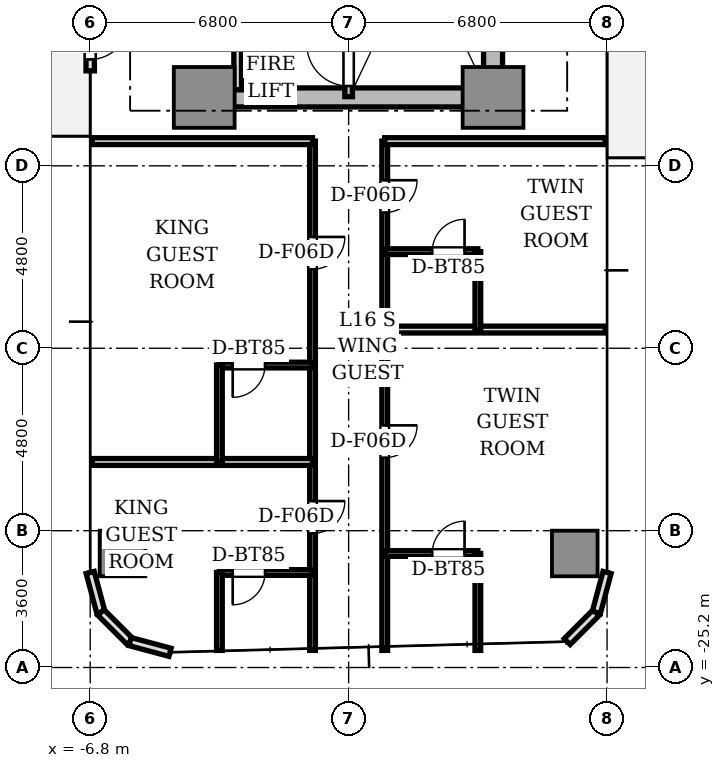
"""IFC4 building model, lengths in metres.
Left out: names, types, materials, properties, quantities, classifications, styles, units other than length and angle.
Written with IfcOpenShell. Run it as: python <this file> out.ifc"""

import sys

from ifc_helpers import new_model, si_unit, direction, frame, frame_2d, origin, origin_2d, place, context, subcontext, project, spatial, rectangle, extrude, source, transform, mapped, element, fill, save


model = new_model("IFC4")
c1 = context("Model", 3, precision=1e-05, world=origin(), true_north=direction((0.0, 1.0)))
c2 = subcontext(c1, "Body", "Model", "MODEL_VIEW")
j1 = project(units=[si_unit("LENGTHUNIT", "METRE"), si_unit("PLANEANGLEUNIT", "RADIAN")], contexts=[c1])
p1 = place(None, origin())
s1 = spatial("IfcSite", under=j1, at=p1, CompositionType="ELEMENT")
p2 = place(p1, origin())
s2 = spatial("IfcBuilding", under=s1, at=p2, CompositionType="ELEMENT")
p3 = place(p2, frame((0.0, 0.0, 61.1)))
s3 = spatial("IfcBuildingStorey", under=s2, at=p3, CompositionType="ELEMENT", Elevation=61.1)
p4 = place(p3, frame((-3.55, -10.2, 0.0), z_axis=(0.0, 0.0, 1.0), x_axis=(1.0, 0.0, 0.0)))
e1 = element("IfcWall", 1, at=p4, inside=s3, PredefinedType="SHEAR", context=c2, shape_type="SweptSolid", body=[
    extrude(rectangle(XDim=7.1, YDim=0.5, at=frame_2d((3.55, 0.0))), origin(), (0.0, 0.0, 1.0), 3.11),
])
p5 = place(p3, frame((3.8, -9.75, 0.0), z_axis=(0.0, 0.0, 1.0), x_axis=(0.0, 1.0, 0.0)))
e2 = element("IfcWall", 2, at=p5, inside=s3, PredefinedType="SHEAR", context=c2, shape_type="SweptSolid", body=[
    extrude(rectangle(XDim=6.9, YDim=0.5, at=frame_2d((3.45, 0.0))), origin(), (0.0, 0.0, 1.0), 3.11),
])
m1 = source(origin(), c2, "Body", "SweptSolid", [
    extrude(rectangle(XDim=1.6, YDim=1.6, at=origin_2d()), origin(), (0.0, 0.0, 1.0), 3.11),
])
for number, where, z_axis, x_axis in (
    (3, (-3.8, -10.2, 0.0), (0.0, 0.0, 1.0), (1.0, 0.0, 0.0)),
    (4, (3.8, -10.2, 0.0), (0.0, 0.0, 1.0), (1.0, 0.0, 0.0)),
):
    element("IfcColumn", number, at=place(p3, frame(where, z_axis=z_axis, x_axis=x_axis)), inside=s3, PredefinedType="COLUMN", context=c2, shape_type="MappedRepresentation", body=[
        mapped(m1, transform((0.0, 0.0, 0.0), scale=1.0)),
    ])
m2 = source(origin(), c2, "Body", "SweptSolid", [
    extrude(rectangle(XDim=1.2, YDim=1.2, at=origin_2d()), origin(), (0.0, 0.0, 1.0), 3.11),
])
for number, where, z_axis, x_axis in (
    (5, (-5.95, -22.2, 0.0), (0.0, 0.0, 1.0), (1.0, 0.0, 0.0)),
    (6, (5.95, -22.2, 0.0), (0.0, 0.0, 1.0), (1.0, 0.0, 0.0)),
):
    element("IfcColumn", number, at=place(p3, frame(where, z_axis=z_axis, x_axis=x_axis)), inside=s3, PredefinedType="COLUMN", context=c2, shape_type="MappedRepresentation", body=[
        mapped(m2, transform((0.0, 0.0, 0.0), scale=1.0)),
    ])
p6 = place(p3, frame((-6.8, -6.8, 0.0), z_axis=(0.0, 0.0, 1.0), x_axis=(0.0, -1.0, 0.0)))
e7 = element("IfcWall", 7, at=p6, inside=s3, PredefinedType="STANDARD", context=c2, shape_type="SweptSolid", body=[
    extrude(rectangle(XDim=2.7, YDim=0.22, at=frame_2d((1.35, 0.0))), origin(), (0.0, 0.0, 1.0), 3.11),
])
p7 = place(p6, frame((1.4, 0.0, 0.0)))
e8 = element("IfcOpeningElement", 8, at=p7, cuts=e7, PredefinedType="OPENING", context=c2, shape_type="SweptSolid", body=[
    extrude(rectangle(XDim=1.0, YDim=2.2, at=frame_2d((0.5, 1.1))), frame((0.0, 0.12, 0.0), z_axis=(0.0, -1.0, 0.0), x_axis=(1.0, 0.0, 0.0)), (0.0, 0.0, 1.0), 0.24),
])
for number, where, z_axis, x_axis in (
    (9, (-6.8, -22.7, 0.0), (0.0, 0.0, 1.0), (0.259, -0.966, 0.0)),
    (10, (-6.519, -23.75, 0.0), (0.0, 0.0, 1.0), (0.707, -0.707, 0.0)),
    (11, (-5.75, -24.519, 0.0), (0.0, 0.0, 1.0), (0.966, -0.259, 0.0)),
    (12, (5.75, -24.519, 0.0), (0.0, 0.0, 1.0), (0.707, 0.707, 0.0)),
    (13, (6.519, -23.75, 0.0), (0.0, 0.0, 1.0), (0.259, 0.966, 0.0)),
):
    element("IfcWall", number, at=place(p3, frame(where, z_axis=z_axis, x_axis=x_axis)), inside=s3, PredefinedType="STANDARD", context=c2, shape_type="SweptSolid", body=[
        extrude(rectangle(XDim=1.087, YDim=0.22, at=frame_2d((0.543, 0.0))), origin(), (0.0, 0.0, 1.0), 3.11),
    ])
p8 = place(p3, frame((0.0, -10.18, 0.0), z_axis=(0.0, 0.0, 1.0), x_axis=(0.0, 1.0, 0.0)))
e14 = element("IfcWall", 14, at=p8, inside=s3, PredefinedType="SOLIDWALL", context=c2, shape_type="SweptSolid", body=[
    extrude(rectangle(XDim=7.68, YDim=0.2, at=frame_2d((3.84, 0.0))), origin(), (0.0, 0.0, 1.0), 3.11),
])
p9 = place(p8, frame((0.28, 0.0, 0.0)))
e15 = element("IfcOpeningElement", 15, at=p9, cuts=e14, PredefinedType="OPENING", context=c2, shape_type="SweptSolid", body=[
    extrude(rectangle(XDim=1.1, YDim=2.15, at=frame_2d((0.55, 1.075))), frame((0.0, 0.11, 0.0), z_axis=(0.0, -1.0, 0.0), x_axis=(1.0, 0.0, 0.0)), (0.0, 0.0, 1.0), 0.22),
])
p10 = place(p3, frame((-2.92, -10.0, 0.0), z_axis=(0.0, 0.0, 1.0), x_axis=(0.0, 1.0, 0.0)))
e16 = element("IfcWall", 16, at=p10, inside=s3, PredefinedType="SOLIDWALL", context=c2, shape_type="SweptSolid", body=[
    extrude(rectangle(XDim=1.44, YDim=0.2, at=frame_2d((0.72, 0.0))), origin(), (0.0, 0.0, 1.0), 2.66),
])
p11 = place(p3, frame((0.95, -11.35, 0.0), z_axis=(0.0, 0.0, 1.0), x_axis=(0.0, -1.0, 0.0)))
e17 = element("IfcWall", 17, at=p11, inside=s3, PredefinedType="PARTITIONING", context=c2, shape_type="SweptSolid", body=[
    extrude(rectangle(XDim=13.4, YDim=0.15, at=frame_2d((6.7, 0.0))), origin(), (0.0, 0.0, 1.0), 2.66),
])
p12 = place(p11, frame((1.029, 0.0, 0.0)))
e18 = element("IfcOpeningElement", 18, at=p12, cuts=e17, PredefinedType="OPENING", context=c2, shape_type="SweptSolid", body=[
    extrude(rectangle(XDim=0.85, YDim=2.1, at=frame_2d((0.425, 1.05))), frame((0.0, 0.085, 0.0), z_axis=(0.0, -1.0, 0.0), x_axis=(1.0, 0.0, 0.0)), (0.0, 0.0, 1.0), 0.17),
])
p13 = place(p11, frame((7.479, 0.0, 0.0)))
e19 = element("IfcOpeningElement", 19, at=p13, cuts=e17, PredefinedType="OPENING", context=c2, shape_type="SweptSolid", body=[
    extrude(rectangle(XDim=0.85, YDim=2.1, at=frame_2d((0.425, 1.05))), frame((0.0, 0.085, 0.0), z_axis=(0.0, -1.0, 0.0), x_axis=(1.0, 0.0, 0.0)), (0.0, 0.0, 1.0), 0.17),
])
p14 = place(p3, frame((-0.95, -11.35, 0.0), z_axis=(0.0, 0.0, 1.0), x_axis=(0.0, -1.0, 0.0)))
e20 = element("IfcWall", 20, at=p14, inside=s3, PredefinedType="PARTITIONING", context=c2, shape_type="SweptSolid", body=[
    extrude(rectangle(XDim=13.4, YDim=0.15, at=frame_2d((6.7, 0.0))), origin(), (0.0, 0.0, 1.0), 2.66),
])
p15 = place(p14, frame((2.521, 0.0, 0.0)))
e21 = element("IfcOpeningElement", 21, at=p15, cuts=e20, PredefinedType="OPENING", context=c2, shape_type="SweptSolid", body=[
    extrude(rectangle(XDim=0.85, YDim=2.1, at=frame_2d((0.425, 1.05))), frame((0.0, 0.085, 0.0), z_axis=(0.0, -1.0, 0.0), x_axis=(1.0, 0.0, 0.0)), (0.0, 0.0, 1.0), 0.17),
])
p16 = place(p14, frame((9.471, 0.0, 0.0)))
e22 = element("IfcOpeningElement", 22, at=p16, cuts=e20, PredefinedType="OPENING", context=c2, shape_type="SweptSolid", body=[
    extrude(rectangle(XDim=0.85, YDim=2.1, at=frame_2d((0.425, 1.05))), frame((0.0, 0.085, 0.0), z_axis=(0.0, -1.0, 0.0), x_axis=(1.0, 0.0, 0.0)), (0.0, 0.0, 1.0), 0.17),
])
for number, where, z_axis, x_axis in (
    (23, (0.95, -11.35, 0.0), (0.0, 0.0, 1.0), (1.0, 0.0, 0.0)),
    (24, (-6.75, -11.35, 0.0), (0.0, 0.0, 1.0), (1.0, 0.0, 0.0)),
    (25, (0.95, -16.308, 0.0), (0.0, 0.0, 1.0), (1.0, 0.0, 0.0)),
):
    element("IfcWall", number, at=place(p3, frame(where, z_axis=z_axis, x_axis=x_axis)), inside=s3, PredefinedType="PARTITIONING", context=c2, shape_type="SweptSolid", body=[
        extrude(rectangle(XDim=5.8, YDim=0.18, at=frame_2d((2.9, 0.0))), origin(), (0.0, 0.0, 1.0), 2.66),
    ])
p17 = place(p3, frame((0.95, -14.258, 0.0), z_axis=(0.0, 0.0, 1.0), x_axis=(1.0, 0.0, 0.0)))
e26 = element("IfcWall", 26, at=p17, inside=s3, PredefinedType="PARTITIONING", context=c2, shape_type="SweptSolid", body=[
    extrude(rectangle(XDim=2.45, YDim=0.15, at=frame_2d((1.225, 0.0))), origin(), (0.0, 0.0, 1.0), 2.66),
])
p18 = place(p17, frame((1.25, 0.0, 0.0)))
e27 = element("IfcOpeningElement", 27, at=p18, cuts=e26, PredefinedType="OPENING", context=c2, shape_type="SweptSolid", body=[
    extrude(rectangle(XDim=0.85, YDim=2.1, at=frame_2d((0.425, 1.05))), frame((0.0, 0.085, 0.0), z_axis=(0.0, -1.0, 0.0), x_axis=(1.0, 0.0, 0.0)), (0.0, 0.0, 1.0), 0.17),
])
p19 = place(p3, frame((3.4, -14.258, 0.0), z_axis=(0.0, 0.0, 1.0), x_axis=(0.0, -1.0, 0.0)))
e28 = element("IfcWall", 28, at=p19, inside=s3, PredefinedType="PARTITIONING", context=c2, shape_type="SweptSolid", body=[
    extrude(rectangle(XDim=2.05, YDim=0.15, at=frame_2d((1.025, 0.0))), origin(), (0.0, 0.0, 1.0), 2.66),
])
p20 = place(p3, frame((0.95, -22.2, 0.0), z_axis=(0.0, 0.0, 1.0), x_axis=(1.0, 0.0, 0.0)))
e29 = element("IfcWall", 29, at=p20, inside=s3, PredefinedType="PARTITIONING", context=c2, shape_type="SweptSolid", body=[
    extrude(rectangle(XDim=2.45, YDim=0.15, at=frame_2d((1.225, 0.0))), origin(), (0.0, 0.0, 1.0), 2.58),
])
p21 = place(p20, frame((1.25, 0.0, 0.0)))
e30 = element("IfcOpeningElement", 30, at=p21, cuts=e29, PredefinedType="OPENING", context=c2, shape_type="SweptSolid", body=[
    extrude(rectangle(XDim=0.85, YDim=2.1, at=frame_2d((0.425, 1.05))), frame((0.0, 0.085, 0.0), z_axis=(0.0, -1.0, 0.0), x_axis=(1.0, 0.0, 0.0)), (0.0, 0.0, 1.0), 0.17),
])
p22 = place(p3, frame((3.4, -22.2, 0.0), z_axis=(0.0, 0.0, 1.0), x_axis=(0.0, -1.0, 0.0)))
e31 = element("IfcWall", 31, at=p22, inside=s3, PredefinedType="PARTITIONING", context=c2, shape_type="SweptSolid", body=[
    extrude(rectangle(XDim=2.55, YDim=0.15, at=frame_2d((1.275, 0.0))), origin(), (0.0, 0.0, 1.0), 2.66),
])
p23 = place(p3, frame((-0.95, -19.792, 0.0), z_axis=(0.0, 0.0, 1.0), x_axis=(-1.0, 0.0, 0.0)))
e32 = element("IfcWall", 32, at=p23, inside=s3, PredefinedType="PARTITIONING", context=c2, shape_type="SweptSolid", body=[
    extrude(rectangle(XDim=5.8, YDim=0.18, at=frame_2d((2.9, 0.0))), origin(), (0.0, 0.0, 1.0), 2.66),
])
p24 = place(p3, frame((-0.95, -17.242, 0.0), z_axis=(0.0, 0.0, 1.0), x_axis=(-1.0, 0.0, 0.0)))
e33 = element("IfcWall", 33, at=p24, inside=s3, PredefinedType="PARTITIONING", context=c2, shape_type="SweptSolid", body=[
    extrude(rectangle(XDim=2.45, YDim=0.15, at=frame_2d((1.225, 0.0))), origin(), (0.0, 0.0, 1.0), 2.66),
])
p25 = place(p24, frame((1.25, 0.0, 0.0)))
e34 = element("IfcOpeningElement", 34, at=p25, cuts=e33, PredefinedType="OPENING", context=c2, shape_type="SweptSolid", body=[
    extrude(rectangle(XDim=0.85, YDim=2.1, at=frame_2d((0.425, 1.05))), frame((0.0, 0.085, 0.0), z_axis=(0.0, -1.0, 0.0), x_axis=(1.0, 0.0, 0.0)), (0.0, 0.0, 1.0), 0.17),
])
p26 = place(p3, frame((-3.4, -17.242, 0.0), z_axis=(0.0, 0.0, 1.0), x_axis=(0.0, -1.0, 0.0)))
e35 = element("IfcWall", 35, at=p26, inside=s3, PredefinedType="PARTITIONING", context=c2, shape_type="SweptSolid", body=[
    extrude(rectangle(XDim=2.55, YDim=0.15, at=frame_2d((1.275, 0.0))), origin(), (0.0, 0.0, 1.0), 2.66),
])
p27 = place(p3, frame((-0.95, -22.7, 0.0), z_axis=(0.0, 0.0, 1.0), x_axis=(-1.0, 0.0, 0.0)))
e36 = element("IfcWall", 36, at=p27, inside=s3, PredefinedType="PARTITIONING", context=c2, shape_type="SweptSolid", body=[
    extrude(rectangle(XDim=2.45, YDim=0.15, at=frame_2d((1.225, 0.0))), origin(), (0.0, 0.0, 1.0), 2.66),
])
p28 = place(p27, frame((1.25, 0.0, 0.0)))
e37 = element("IfcOpeningElement", 37, at=p28, cuts=e36, PredefinedType="OPENING", context=c2, shape_type="SweptSolid", body=[
    extrude(rectangle(XDim=0.85, YDim=2.1, at=frame_2d((0.425, 1.05))), frame((0.0, 0.085, 0.0), z_axis=(0.0, -1.0, 0.0), x_axis=(1.0, 0.0, 0.0)), (0.0, 0.0, 1.0), 0.17),
])
p29 = place(p3, frame((-3.4, -22.7, 0.0), z_axis=(0.0, 0.0, 1.0), x_axis=(0.0, -1.0, 0.0)))
e38 = element("IfcWall", 38, at=p29, inside=s3, PredefinedType="PARTITIONING", context=c2, shape_type="SweptSolid", body=[
    extrude(rectangle(XDim=2.05, YDim=0.15, at=frame_2d((1.025, 0.0))), origin(), (0.0, 0.0, 1.0), 2.66),
])
m3 = source(origin(), c2, "Body", "SweptSolid", [
    extrude(rectangle(XDim=1.0, YDim=0.05, at=origin_2d()), origin(), (0.0, 0.0, 1.0), 2.2),
])
p30 = place(p7, frame((0.5, 0.0, 0.0)))
e39 = element("IfcDoor", 39, at=p30, inside=s3, OperationType="SINGLE_SWING_LEFT", PredefinedType="DOOR", context=c2, shape_type="MappedRepresentation", body=[
    mapped(m3, transform((0.0, 0.0, 0.0), scale=1.0)),
])
fill(e8, e39)
m4 = source(origin(), c2, "Body", "SweptSolid", [
    extrude(rectangle(XDim=1.1, YDim=0.05, at=origin_2d()), origin(), (0.0, 0.0, 1.0), 2.15),
])
p31 = place(p9, frame((0.55, 0.0, 0.0)))
e40 = element("IfcDoor", 40, at=p31, inside=s3, OperationType="SINGLE_SWING_RIGHT", PredefinedType="DOOR", context=c2, shape_type="MappedRepresentation", body=[
    mapped(m4, transform((0.0, 0.0, 0.0), scale=1.0)),
])
fill(e15, e40)
m5 = source(origin(), c2, "Body", "SweptSolid", [
    extrude(rectangle(XDim=0.85, YDim=0.05, at=origin_2d()), origin(), (0.0, 0.0, 1.0), 2.1),
])
p32 = place(p18, frame((0.425, 0.0, 0.0)))
e41 = element("IfcDoor", 41, at=p32, inside=s3, OperationType="SINGLE_SWING_RIGHT", PredefinedType="DOOR", context=c2, shape_type="MappedRepresentation", body=[
    mapped(m5, transform((0.0, 0.0, 0.0), scale=1.0)),
])
fill(e27, e41)
p33 = place(p12, frame((0.425, 0.0, 0.0)))
e42 = element("IfcDoor", 42, at=p33, inside=s3, OperationType="SINGLE_SWING_LEFT", PredefinedType="DOOR", context=c2, shape_type="MappedRepresentation", body=[
    mapped(m5, transform((0.0, 0.0, 0.0), scale=1.0)),
])
fill(e18, e42)
p34 = place(p21, frame((0.425, 0.0, 0.0)))
e43 = element("IfcDoor", 43, at=p34, inside=s3, OperationType="SINGLE_SWING_RIGHT", PredefinedType="DOOR", context=c2, shape_type="MappedRepresentation", body=[
    mapped(m5, transform((0.0, 0.0, 0.0), scale=1.0)),
])
fill(e30, e43)
p35 = place(p13, frame((0.425, 0.0, 0.0)))
e44 = element("IfcDoor", 44, at=p35, inside=s3, OperationType="SINGLE_SWING_LEFT", PredefinedType="DOOR", context=c2, shape_type="MappedRepresentation", body=[
    mapped(m5, transform((0.0, 0.0, 0.0), scale=1.0)),
])
fill(e19, e44)
p36 = place(p25, frame((0.425, 0.0, 0.0)))
e45 = element("IfcDoor", 45, at=p36, inside=s3, OperationType="SINGLE_SWING_RIGHT", PredefinedType="DOOR", context=c2, shape_type="MappedRepresentation", body=[
    mapped(m5, transform((0.0, 0.0, 0.0), scale=1.0)),
])
fill(e34, e45)
p37 = place(p15, frame((0.425, 0.0, 0.0)))
e46 = element("IfcDoor", 46, at=p37, inside=s3, OperationType="SINGLE_SWING_LEFT", PredefinedType="DOOR", context=c2, shape_type="MappedRepresentation", body=[
    mapped(m5, transform((0.0, 0.0, 0.0), scale=1.0)),
])
fill(e21, e46)
p38 = place(p28, frame((0.425, 0.0, 0.0)))
e47 = element("IfcDoor", 47, at=p38, inside=s3, OperationType="SINGLE_SWING_RIGHT", PredefinedType="DOOR", context=c2, shape_type="MappedRepresentation", body=[
    mapped(m5, transform((0.0, 0.0, 0.0), scale=1.0)),
])
fill(e37, e47)
p39 = place(p16, frame((0.425, 0.0, 0.0)))
e48 = element("IfcDoor", 48, at=p39, inside=s3, OperationType="SINGLE_SWING_LEFT", PredefinedType="DOOR", context=c2, shape_type="MappedRepresentation", body=[
    mapped(m5, transform((0.0, 0.0, 0.0), scale=1.0)),
])
fill(e22, e48)
save(model, sys.argv[1])
